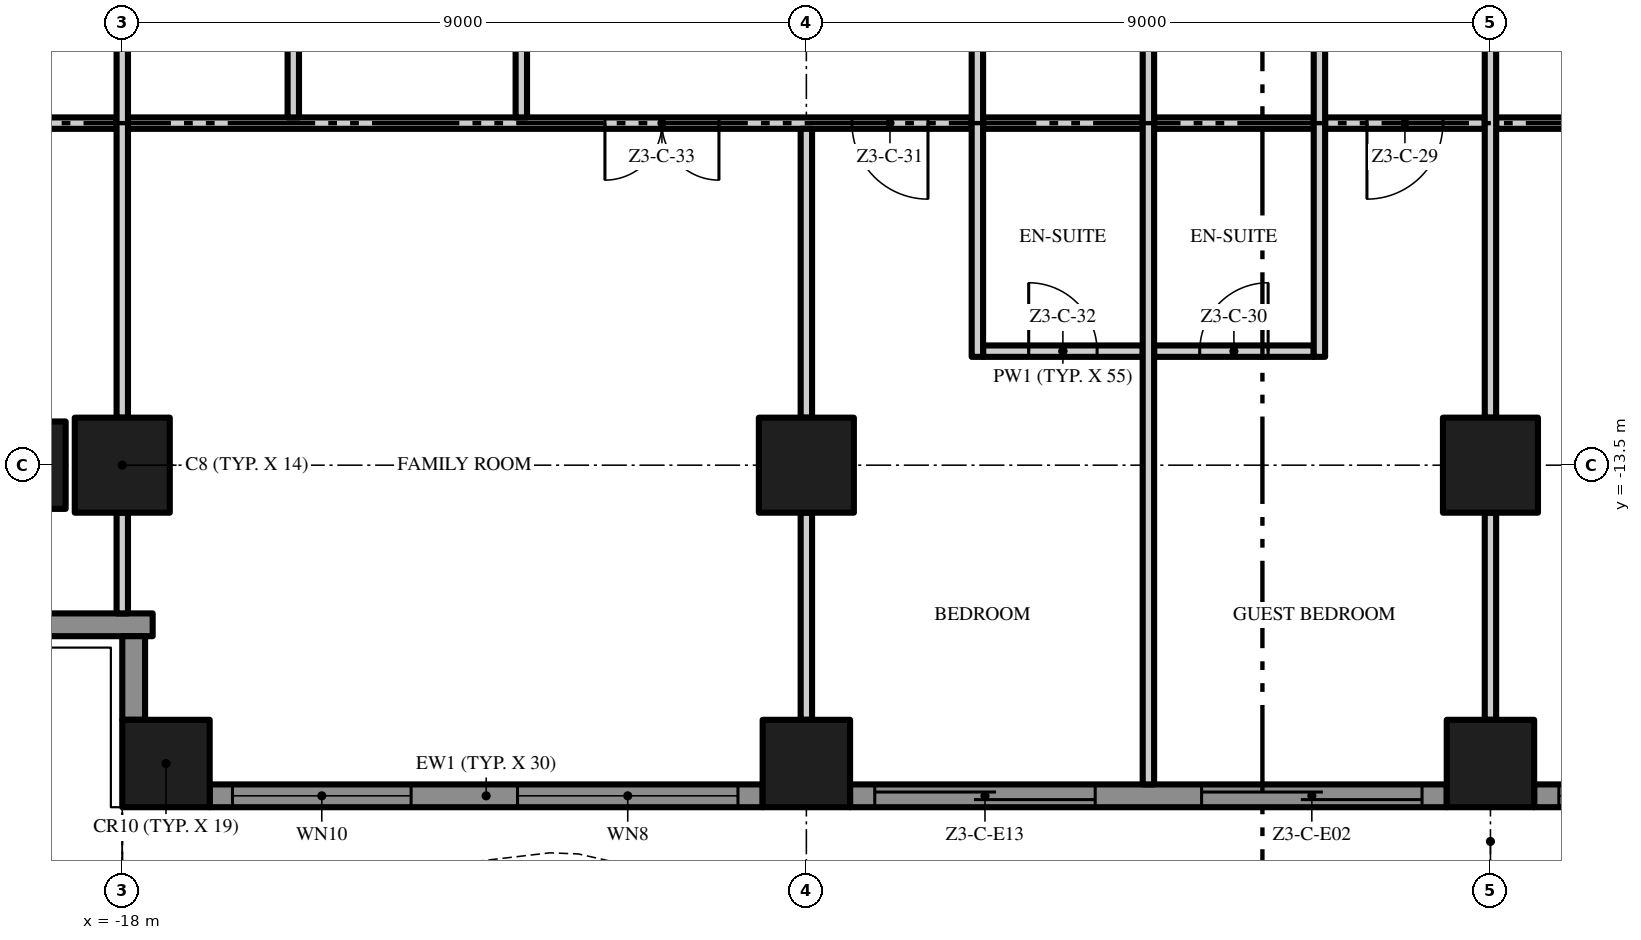
"""IFC4 building model, lengths in metres.
Left out: names, types, materials, properties, quantities, classifications, styles, units other than length and angle.
Written with IfcOpenShell. Run it as: python <this file> out.ifc"""

import sys

from ifc_helpers import new_model, si_unit, direction, frame, frame_2d, origin, origin_2d, place, context, subcontext, project, spatial, polyline, rectangle, outline, extrude, element, fill, save


model = new_model("IFC4")
c1 = context("Model", 3, precision=1e-05, world=origin(), true_north=direction((0.0, 1.0)))
c2 = subcontext(c1, "Body", "Model", "MODEL_VIEW")
j1 = project(units=[si_unit("LENGTHUNIT", "METRE"), si_unit("PLANEANGLEUNIT", "RADIAN")], contexts=[c1])
p1 = place(None, origin())
s1 = spatial("IfcSite", under=j1, at=p1, CompositionType="ELEMENT")
p2 = place(p1, origin())
s2 = spatial("IfcBuilding", under=s1, at=p2, CompositionType="ELEMENT")
p3 = place(p2, frame((0.0, 0.0, 155.4)))
s3 = spatial("IfcBuildingStorey", under=s2, at=p3, CompositionType="ELEMENT", Elevation=155.4)
p4 = place(p3, frame((-18.0, -13.5, 0.0), z_axis=(0.0, 0.0, 1.0), x_axis=(1.0, 0.0, 0.0)))
e1 = element("IfcColumn", 1, at=p4, inside=s3, PredefinedType="COLUMN", context=c2, shape_type="SweptSolid", body=[
    extrude(rectangle(XDim=1.25, YDim=1.25, at=origin_2d()), origin(), (0.0, 0.0, 1.0), 3.5),
])
for number, where, z_axis, x_axis in (
    (2, (-17.425, -17.425, 0.0), (0.0, 0.0, 1.0), (1.0, 0.0, 0.0)),
    (3, (-19.32, -13.5, 0.0), (0.0, 0.0, 1.0), (1.0, 0.0, 0.0)),
):
    element("IfcColumn", number, at=place(p3, frame(where, z_axis=z_axis, x_axis=x_axis)), inside=s3, PredefinedType="COLUMN", context=c2, shape_type="SweptSolid", body=[
        extrude(rectangle(XDim=1.15, YDim=1.15, at=origin_2d()), origin(), (0.0, 0.0, 1.0), 3.5),
    ])
p5 = place(p3, frame((-9.0, -13.5, 0.0), z_axis=(0.0, 0.0, 1.0), x_axis=(1.0, 0.0, 0.0)))
e4 = element("IfcColumn", 4, at=p5, inside=s3, PredefinedType="COLUMN", context=c2, shape_type="SweptSolid", body=[
    extrude(rectangle(XDim=1.25, YDim=1.25, at=origin_2d()), origin(), (0.0, 0.0, 1.0), 3.5),
])
p6 = place(p3, frame((-9.0, -17.425, 0.0), z_axis=(0.0, 0.0, 1.0), x_axis=(1.0, 0.0, 0.0)))
e5 = element("IfcColumn", 5, at=p6, inside=s3, PredefinedType="COLUMN", context=c2, shape_type="SweptSolid", body=[
    extrude(rectangle(XDim=1.15, YDim=1.15, at=origin_2d()), origin(), (0.0, 0.0, 1.0), 3.5),
])
p7 = place(p3, frame((0.0, -13.5, 0.0), z_axis=(0.0, 0.0, 1.0), x_axis=(1.0, 0.0, 0.0)))
e6 = element("IfcColumn", 6, at=p7, inside=s3, PredefinedType="COLUMN", context=c2, shape_type="SweptSolid", body=[
    extrude(rectangle(XDim=1.25, YDim=1.25, at=origin_2d()), origin(), (0.0, 0.0, 1.0), 3.5),
])
p8 = place(p3, frame((0.0, -17.425, 0.0), z_axis=(0.0, 0.0, 1.0), x_axis=(1.0, 0.0, 0.0)))
e7 = element("IfcColumn", 7, at=p8, inside=s3, PredefinedType="COLUMN", context=c2, shape_type="SweptSolid", body=[
    extrude(rectangle(XDim=1.15, YDim=1.15, at=origin_2d()), origin(), (0.0, 0.0, 1.0), 3.5),
])
p9 = place(p3, frame((-9.575, -17.85, 0.0), z_axis=(0.0, 0.0, 1.0), x_axis=(-1.0, 0.0, 0.0)))
e8 = element("IfcWall", 8, at=p9, inside=s3, PredefinedType="SOLIDWALL", context=c2, shape_type="SweptSolid", body=[
    extrude(rectangle(XDim=7.275, YDim=0.3, at=frame_2d((3.638, 0.0))), origin(), (0.0, 0.0, 1.0), 3.5),
])
p10 = place(p9, frame((4.625, 0.0, 0.45)))
e9 = element("IfcOpeningElement", 9, at=p10, cuts=e8, PredefinedType="OPENING", context=c2, shape_type="SweptSolid", body=[
    extrude(rectangle(XDim=2.35, YDim=2.65, at=frame_2d((1.175, 1.325))), frame((0.0, 0.16, 0.0), z_axis=(0.0, -1.0, 0.0), x_axis=(1.0, 0.0, 0.0)), (0.0, 0.0, 1.0), 0.32),
])
p11 = place(p9, frame((0.325, 0.0, 0.45)))
e10 = element("IfcOpeningElement", 10, at=p11, cuts=e8, PredefinedType="OPENING", context=c2, shape_type="SweptSolid", body=[
    extrude(rectangle(XDim=2.9, YDim=2.65, at=frame_2d((1.45, 1.325))), frame((0.0, 0.16, 0.0), z_axis=(0.0, -1.0, 0.0), x_axis=(1.0, 0.0, 0.0)), (0.0, 0.0, 1.0), 0.32),
])
p12 = place(p3, frame((-0.575, -17.85, 0.0), z_axis=(0.0, 0.0, 1.0), x_axis=(-1.0, 0.0, 0.0)))
e11 = element("IfcWall", 11, at=p12, inside=s3, PredefinedType="SOLIDWALL", context=c2, shape_type="SweptSolid", body=[
    extrude(rectangle(XDim=7.85, YDim=0.3, at=frame_2d((3.925, 0.0))), origin(), (0.0, 0.0, 1.0), 3.5),
])
p13 = place(p12, frame((4.625, 0.0, 0.0)))
e12 = element("IfcOpeningElement", 12, at=p13, cuts=e11, PredefinedType="OPENING", context=c2, shape_type="SweptSolid", body=[
    extrude(rectangle(XDim=2.9, YDim=2.4, at=frame_2d((1.45, 1.2))), frame((0.0, 0.16, 0.0), z_axis=(0.0, -1.0, 0.0), x_axis=(1.0, 0.0, 0.0)), (0.0, 0.0, 1.0), 0.32),
])
p14 = place(p12, frame((0.325, 0.0, 0.0)))
e13 = element("IfcOpeningElement", 13, at=p14, cuts=e11, PredefinedType="OPENING", context=c2, shape_type="SweptSolid", body=[
    extrude(rectangle(XDim=2.9, YDim=2.4, at=frame_2d((1.45, 1.2))), frame((0.0, 0.16, 0.0), z_axis=(0.0, -1.0, 0.0), x_axis=(1.0, 0.0, 0.0)), (0.0, 0.0, 1.0), 0.32),
])
p15 = place(p3, frame((8.425, -17.85, 0.0), z_axis=(0.0, 0.0, 1.0), x_axis=(-1.0, 0.0, 0.0)))
e14 = element("IfcWall", 14, at=p15, inside=s3, PredefinedType="SOLIDWALL", context=c2, shape_type="SweptSolid", body=[
    extrude(rectangle(XDim=7.85, YDim=0.3, at=frame_2d((3.925, 0.0))), origin(), (0.0, 0.0, 1.0), 3.5),
])
p16 = place(p15, frame((4.625, 0.0, 0.45)))
e15 = element("IfcOpeningElement", 15, at=p16, cuts=e14, PredefinedType="OPENING", context=c2, shape_type="SweptSolid", body=[
    extrude(rectangle(XDim=2.9, YDim=2.65, at=frame_2d((1.45, 1.325))), frame((0.0, 0.16, 0.0), z_axis=(0.0, -1.0, 0.0), x_axis=(1.0, 0.0, 0.0)), (0.0, 0.0, 1.0), 0.32),
])
p17 = place(p15, frame((0.325, 0.0, 0.45)))
e16 = element("IfcOpeningElement", 16, at=p17, cuts=e14, PredefinedType="OPENING", context=c2, shape_type="SweptSolid", body=[
    extrude(rectangle(XDim=2.9, YDim=2.65, at=frame_2d((1.45, 1.325))), frame((0.0, 0.16, 0.0), z_axis=(0.0, -1.0, 0.0), x_axis=(1.0, 0.0, 0.0)), (0.0, 0.0, 1.0), 0.32),
])
p18 = place(p3, frame((-17.6, -15.6, 0.0), z_axis=(0.0, 0.0, 1.0), x_axis=(-1.0, 0.0, 0.0)))
e17 = element("IfcWall", 17, at=p18, inside=s3, PredefinedType="SOLIDWALL", context=c2, shape_type="SweptSolid", body=[
    extrude(rectangle(XDim=2.35, YDim=0.3, at=frame_2d((1.175, 0.0))), origin(), (0.0, 0.0, 1.0), 3.5),
])
p19 = place(p3, frame((-17.85, -16.85, 0.0), z_axis=(0.0, 0.0, 1.0), x_axis=(0.0, 1.0, 0.0)))
e18 = element("IfcWall", 18, at=p19, inside=s3, PredefinedType="SOLIDWALL", context=c2, shape_type="SweptSolid", body=[
    extrude(rectangle(XDim=1.1, YDim=0.3, at=frame_2d((0.55, 0.0))), origin(), (0.0, 0.0, 1.0), 3.5),
])
p20 = place(p3, origin())
e19 = element("IfcWall", 19, at=p20, inside=s3, PredefinedType="USERDEFINED", context=c2, shape_type="SweptSolid", body=[
    extrude(outline(polyline([(-18.0, -20.649), (-16.5, -19.988), (-15.0, -19.255), (-13.5, -18.731), (-12.375, -18.6), (-12.0, -18.615), (-10.5, -18.951), (-9.0, -19.612), (-7.5, -20.345), (-6.0, -20.869), (-4.875, -21.0), (-4.5, -20.985), (-3.0, -20.649), (-1.5, -19.988), (0.0, -19.255), (1.5, -18.731), (2.625, -18.6), (3.0, -18.615), (4.5, -18.951), (6.0, -19.612), (7.5, -20.345), (9.0, -20.869), (10.125, -21.0), (10.5, -20.985), (12.0, -20.649), (13.5, -19.988), (15.0, -19.255), (16.5, -18.731), (17.625, -18.6), (18.0, -18.615), (18.01, -18.365), (17.615, -18.349), (16.444, -18.486), (14.904, -19.024), (13.395, -19.761), (11.921, -20.41), (10.467, -20.736), (10.135, -20.749), (9.056, -20.624), (7.596, -20.114), (6.105, -19.385), (4.579, -18.713), (3.033, -18.366), (2.615, -18.349), (1.444, -18.486), (-0.096, -19.024), (-1.605, -19.761), (-3.079, -20.41), (-4.533, -20.736), (-4.865, -20.749), (-5.944, -20.624), (-7.404, -20.114), (-8.895, -19.385), (-10.421, -18.713), (-11.967, -18.366), (-12.385, -18.349), (-13.556, -18.486), (-15.096, -19.024), (-16.605, -19.761), (-18.101, -20.42), (-18.0, -20.649)])), origin(), (0.0, 0.0, 1.0), 0.9),
])
p21 = place(p3, frame((-6.675, -12.0, 0.0), z_axis=(0.0, 0.0, 1.0), x_axis=(1.0, 0.0, 0.0)))
e20 = element("IfcWall", 20, at=p21, inside=s3, PredefinedType="PARTITIONING", context=c2, shape_type="SweptSolid", body=[
    extrude(rectangle(XDim=2.1, YDim=0.15, at=frame_2d((1.05, 0.0))), origin(), (0.0, 0.0, 1.0), 3.5),
])
p22 = place(p21, frame((0.6, 0.0, 0.0)))
e21 = element("IfcOpeningElement", 21, at=p22, cuts=e20, PredefinedType="OPENING", context=c2, shape_type="SweptSolid", body=[
    extrude(rectangle(XDim=0.9, YDim=2.1, at=frame_2d((0.45, 1.05))), frame((0.0, 0.085, 0.0), z_axis=(0.0, -1.0, 0.0), x_axis=(1.0, 0.0, 0.0)), (0.0, 0.0, 1.0), 0.17),
])
p23 = place(p3, frame((-4.425, -12.0, 0.0), z_axis=(0.0, 0.0, 1.0), x_axis=(1.0, 0.0, 0.0)))
e22 = element("IfcWall", 22, at=p23, inside=s3, PredefinedType="PARTITIONING", context=c2, shape_type="SweptSolid", body=[
    extrude(rectangle(XDim=2.1, YDim=0.15, at=frame_2d((1.05, 0.0))), origin(), (0.0, 0.0, 1.0), 3.5),
])
p24 = place(p23, frame((0.6, 0.0, 0.0)))
e23 = element("IfcOpeningElement", 23, at=p24, cuts=e22, PredefinedType="OPENING", context=c2, shape_type="SweptSolid", body=[
    extrude(rectangle(XDim=0.9, YDim=2.1, at=frame_2d((0.45, 1.05))), frame((0.0, 0.085, 0.0), z_axis=(0.0, -1.0, 0.0), x_axis=(1.0, 0.0, 0.0)), (0.0, 0.0, 1.0), 0.17),
])
p25 = place(p3, frame((-18.075, -9.0, 0.0), z_axis=(0.0, 0.0, 1.0), x_axis=(-1.0, 0.0, 0.0)))
e24 = element("IfcWall", 24, at=p25, inside=s3, PredefinedType="PARTITIONING", context=c2, shape_type="SweptSolid", body=[
    extrude(rectangle(XDim=4.125, YDim=0.15, at=frame_2d((2.062, 0.0))), origin(), (0.0, 0.0, 1.0), 3.5),
])
p26 = place(p25, frame((1.425, 0.0, 0.0)))
e25 = element("IfcOpeningElement", 25, at=p26, cuts=e24, PredefinedType="OPENING", context=c2, shape_type="SweptSolid", body=[
    extrude(rectangle(XDim=1.5, YDim=2.4, at=frame_2d((0.75, 1.2))), frame((0.0, 0.085, 0.0), z_axis=(0.0, -1.0, 0.0), x_axis=(1.0, 0.0, 0.0)), (0.0, 0.0, 1.0), 0.17),
])
p27 = place(p3, frame((-6.825, -9.0, 0.0), z_axis=(0.0, 0.0, 1.0), x_axis=(-1.0, 0.0, 0.0)))
e26 = element("IfcWall", 26, at=p27, inside=s3, PredefinedType="PARTITIONING", context=c2, shape_type="SweptSolid", body=[
    extrude(rectangle(XDim=11.1, YDim=0.15, at=frame_2d((5.55, 0.0))), origin(), (0.0, 0.0, 1.0), 3.5),
])
p28 = place(p27, frame((0.575, 0.0, 0.0)))
e27 = element("IfcOpeningElement", 27, at=p28, cuts=e26, PredefinedType="OPENING", context=c2, shape_type="SweptSolid", body=[
    extrude(rectangle(XDim=1.0, YDim=2.4, at=frame_2d((0.5, 1.2))), frame((0.0, 0.085, 0.0), z_axis=(0.0, -1.0, 0.0), x_axis=(1.0, 0.0, 0.0)), (0.0, 0.0, 1.0), 0.17),
])
p29 = place(p27, frame((3.325, 0.0, 0.0)))
e28 = element("IfcOpeningElement", 28, at=p29, cuts=e26, PredefinedType="OPENING", context=c2, shape_type="SweptSolid", body=[
    extrude(rectangle(XDim=1.5, YDim=2.4, at=frame_2d((0.75, 1.2))), frame((0.0, 0.085, 0.0), z_axis=(0.0, -1.0, 0.0), x_axis=(1.0, 0.0, 0.0)), (0.0, 0.0, 1.0), 0.17),
])
for number, where, z_axis, x_axis in (
    (29, (-6.675, -9.0, 0.0), (0.0, 0.0, 1.0), (1.0, 0.0, 0.0)),
    (30, (-4.425, -9.0, 0.0), (0.0, 0.0, 1.0), (1.0, 0.0, 0.0)),
):
    element("IfcWall", number, at=place(p3, frame(where, z_axis=z_axis, x_axis=x_axis)), inside=s3, PredefinedType="PARTITIONING", context=c2, shape_type="SweptSolid", body=[
        extrude(rectangle(XDim=2.1, YDim=0.15, at=frame_2d((1.05, 0.0))), origin(), (0.0, 0.0, 1.0), 3.5),
    ])
p30 = place(p3, frame((-0.075, -9.0, 0.0), z_axis=(0.0, 0.0, 1.0), x_axis=(-1.0, 0.0, 0.0)))
e31 = element("IfcWall", 31, at=p30, inside=s3, PredefinedType="PARTITIONING", context=c2, shape_type="SweptSolid", body=[
    extrude(rectangle(XDim=2.1, YDim=0.15, at=frame_2d((1.05, 0.0))), origin(), (0.0, 0.0, 1.0), 3.5),
])
p31 = place(p30, frame((0.55, 0.0, 0.0)))
e32 = element("IfcOpeningElement", 32, at=p31, cuts=e31, PredefinedType="OPENING", context=c2, shape_type="SweptSolid", body=[
    extrude(rectangle(XDim=1.0, YDim=2.4, at=frame_2d((0.5, 1.2))), frame((0.0, 0.085, 0.0), z_axis=(0.0, -1.0, 0.0), x_axis=(1.0, 0.0, 0.0)), (0.0, 0.0, 1.0), 0.17),
])
p32 = place(p3, frame((4.425, -9.0, 0.0), z_axis=(0.0, 0.0, 1.0), x_axis=(-1.0, 0.0, 0.0)))
e33 = element("IfcWall", 33, at=p32, inside=s3, PredefinedType="PARTITIONING", context=c2, shape_type="SweptSolid", body=[
    extrude(rectangle(XDim=4.35, YDim=0.15, at=frame_2d((2.175, 0.0))), origin(), (0.0, 0.0, 1.0), 3.5),
])
p33 = place(p32, frame((0.575, 0.0, 0.0)))
e34 = element("IfcOpeningElement", 34, at=p33, cuts=e33, PredefinedType="OPENING", context=c2, shape_type="SweptSolid", body=[
    extrude(rectangle(XDim=1.0, YDim=2.4, at=frame_2d((0.5, 1.2))), frame((0.0, 0.085, 0.0), z_axis=(0.0, -1.0, 0.0), x_axis=(1.0, 0.0, 0.0)), (0.0, 0.0, 1.0), 0.17),
])
p34 = place(p3, frame((-18.0, -15.45, 0.0), z_axis=(0.0, 0.0, 1.0), x_axis=(0.0, 1.0, 0.0)))
e35 = element("IfcWall", 35, at=p34, inside=s3, PredefinedType="PARTITIONING", context=c2, shape_type="SweptSolid", body=[
    extrude(rectangle(XDim=1.325, YDim=0.15, at=frame_2d((0.662, 0.0))), origin(), (0.0, 0.0, 1.0), 3.5),
])
p35 = place(p3, frame((-18.0, -12.875, 0.0), z_axis=(0.0, 0.0, 1.0), x_axis=(0.0, 1.0, 0.0)))
e36 = element("IfcWall", 36, at=p35, inside=s3, PredefinedType="PARTITIONING", context=c2, shape_type="SweptSolid", body=[
    extrude(rectangle(XDim=7.75, YDim=0.15, at=frame_2d((3.875, 0.0))), origin(), (0.0, 0.0, 1.0), 3.5),
])
p36 = place(p3, frame((-15.75, -8.925, 0.0), z_axis=(0.0, 0.0, 1.0), x_axis=(0.0, 1.0, 0.0)))
e37 = element("IfcWall", 37, at=p36, inside=s3, PredefinedType="PARTITIONING", context=c2, shape_type="SweptSolid", body=[
    extrude(rectangle(XDim=4.35, YDim=0.15, at=frame_2d((2.175, 0.0))), origin(), (0.0, 0.0, 1.0), 3.5),
])
p37 = place(p3, frame((-12.75, -8.925, 0.0), z_axis=(0.0, 0.0, 1.0), x_axis=(0.0, 1.0, 0.0)))
e38 = element("IfcWall", 38, at=p37, inside=s3, PredefinedType="PARTITIONING", context=c2, shape_type="SweptSolid", body=[
    extrude(rectangle(XDim=4.5, YDim=0.15, at=frame_2d((2.25, 0.0))), origin(), (0.0, 0.0, 1.0), 3.5),
])
p38 = place(p3, frame((-9.0, -16.85, 0.0), z_axis=(0.0, 0.0, 1.0), x_axis=(0.0, 1.0, 0.0)))
e39 = element("IfcWall", 39, at=p38, inside=s3, PredefinedType="PARTITIONING", context=c2, shape_type="SweptSolid", body=[
    extrude(rectangle(XDim=2.725, YDim=0.15, at=frame_2d((1.363, 0.0))), origin(), (0.0, 0.0, 1.0), 3.5),
])
p39 = place(p3, frame((-9.0, -12.875, 0.0), z_axis=(0.0, 0.0, 1.0), x_axis=(0.0, 1.0, 0.0)))
e40 = element("IfcWall", 40, at=p39, inside=s3, PredefinedType="PARTITIONING", context=c2, shape_type="SweptSolid", body=[
    extrude(rectangle(XDim=3.8, YDim=0.15, at=frame_2d((1.9, 0.0))), origin(), (0.0, 0.0, 1.0), 3.5),
])
p40 = place(p3, frame((-6.75, -12.075, 0.0), z_axis=(0.0, 0.0, 1.0), x_axis=(0.0, 1.0, 0.0)))
e41 = element("IfcWall", 41, at=p40, inside=s3, PredefinedType="PARTITIONING", context=c2, shape_type="SweptSolid", body=[
    extrude(rectangle(XDim=7.65, YDim=0.15, at=frame_2d((3.825, 0.0))), origin(), (0.0, 0.0, 1.0), 3.5),
])
p41 = place(p3, frame((-4.5, -17.7, 0.0), z_axis=(0.0, 0.0, 1.0), x_axis=(0.0, 1.0, 0.0)))
e42 = element("IfcWall", 42, at=p41, inside=s3, PredefinedType="PARTITIONING", context=c2, shape_type="SweptSolid", body=[
    extrude(rectangle(XDim=13.125, YDim=0.15, at=frame_2d((6.562, 0.0))), origin(), (0.0, 0.0, 1.0), 3.5),
])
p42 = place(p3, frame((-2.25, -12.075, 0.0), z_axis=(0.0, 0.0, 1.0), x_axis=(0.0, 1.0, 0.0)))
e43 = element("IfcWall", 43, at=p42, inside=s3, PredefinedType="PARTITIONING", context=c2, shape_type="SweptSolid", body=[
    extrude(rectangle(XDim=7.65, YDim=0.15, at=frame_2d((3.825, 0.0))), origin(), (0.0, 0.0, 1.0), 3.5),
])
p43 = place(p3, frame((0.0, -16.85, 0.0), z_axis=(0.0, 0.0, 1.0), x_axis=(0.0, 1.0, 0.0)))
e44 = element("IfcWall", 44, at=p43, inside=s3, PredefinedType="PARTITIONING", context=c2, shape_type="SweptSolid", body=[
    extrude(rectangle(XDim=2.725, YDim=0.15, at=frame_2d((1.363, 0.0))), origin(), (0.0, 0.0, 1.0), 3.5),
])
p44 = place(p3, frame((0.0, -12.875, 0.0), z_axis=(0.0, 0.0, 1.0), x_axis=(0.0, 1.0, 0.0)))
e45 = element("IfcWall", 45, at=p44, inside=s3, PredefinedType="PARTITIONING", context=c2, shape_type="SweptSolid", body=[
    extrude(rectangle(XDim=7.75, YDim=0.15, at=frame_2d((3.875, 0.0))), origin(), (0.0, 0.0, 1.0), 3.5),
])
p45 = place(p10, origin())
e46 = element("IfcWindow", 46, at=p45, inside=s3, PartitioningType="SINGLE_PANEL", PredefinedType="WINDOW", context=c2, shape_type="SweptSolid", body=[
    extrude(rectangle(XDim=2.35, YDim=2.65, at=frame_2d((1.175, 1.325))), frame((0.0, 0.03, 0.0), z_axis=(0.0, -1.0, 0.0), x_axis=(1.0, 0.0, 0.0)), (0.0, 0.0, 1.0), 0.06),
])
fill(e9, e46)
p46 = place(p11, origin())
e47 = element("IfcWindow", 47, at=p46, inside=s3, PartitioningType="SINGLE_PANEL", PredefinedType="WINDOW", context=c2, shape_type="SweptSolid", body=[
    extrude(rectangle(XDim=2.9, YDim=2.65, at=frame_2d((1.45, 1.325))), frame((0.0, 0.03, 0.0), z_axis=(0.0, -1.0, 0.0), x_axis=(1.0, 0.0, 0.0)), (0.0, 0.0, 1.0), 0.06),
])
fill(e10, e47)
p47 = place(p13, origin())
e48 = element("IfcDoor", 48, at=p47, inside=s3, OperationType="SINGLE_SWING_LEFT", PredefinedType="DOOR", context=c2, shape_type="SweptSolid", body=[
    extrude(rectangle(XDim=2.9, YDim=2.4, at=frame_2d((1.45, 1.2))), frame((0.0, 0.025, 0.0), z_axis=(0.0, -1.0, 0.0), x_axis=(1.0, 0.0, 0.0)), (0.0, 0.0, 1.0), 0.05),
])
fill(e12, e48)
p48 = place(p14, origin())
e49 = element("IfcDoor", 49, at=p48, inside=s3, OperationType="SINGLE_SWING_LEFT", PredefinedType="DOOR", context=c2, shape_type="SweptSolid", body=[
    extrude(rectangle(XDim=2.9, YDim=2.4, at=frame_2d((1.45, 1.2))), frame((0.0, 0.025, 0.0), z_axis=(0.0, -1.0, 0.0), x_axis=(1.0, 0.0, 0.0)), (0.0, 0.0, 1.0), 0.05),
])
fill(e13, e49)
p49 = place(p16, origin())
e50 = element("IfcWindow", 50, at=p49, inside=s3, PartitioningType="SINGLE_PANEL", PredefinedType="WINDOW", context=c2, shape_type="SweptSolid", body=[
    extrude(rectangle(XDim=2.9, YDim=2.65, at=frame_2d((1.45, 1.325))), frame((0.0, 0.03, 0.0), z_axis=(0.0, -1.0, 0.0), x_axis=(1.0, 0.0, 0.0)), (0.0, 0.0, 1.0), 0.06),
])
fill(e15, e50)
p50 = place(p31, origin())
e51 = element("IfcDoor", 51, at=p50, inside=s3, OperationType="SINGLE_SWING_RIGHT", PredefinedType="DOOR", context=c2, shape_type="SweptSolid", body=[
    extrude(rectangle(XDim=1.0, YDim=2.4, at=frame_2d((0.5, 1.2))), frame((0.0, 0.025, 0.0), z_axis=(0.0, -1.0, 0.0), x_axis=(1.0, 0.0, 0.0)), (0.0, 0.0, 1.0), 0.05),
])
fill(e32, e51)
p51 = place(p24, origin())
e52 = element("IfcDoor", 52, at=p51, inside=s3, OperationType="SINGLE_SWING_RIGHT", PredefinedType="DOOR", context=c2, shape_type="SweptSolid", body=[
    extrude(rectangle(XDim=0.9, YDim=2.1, at=frame_2d((0.45, 1.05))), frame((0.0, 0.025, 0.0), z_axis=(0.0, -1.0, 0.0), x_axis=(1.0, 0.0, 0.0)), (0.0, 0.0, 1.0), 0.05),
])
fill(e23, e52)
p52 = place(p28, origin())
e53 = element("IfcDoor", 53, at=p52, inside=s3, OperationType="SINGLE_SWING_LEFT", PredefinedType="DOOR", context=c2, shape_type="SweptSolid", body=[
    extrude(rectangle(XDim=1.0, YDim=2.4, at=frame_2d((0.5, 1.2))), frame((0.0, 0.025, 0.0), z_axis=(0.0, -1.0, 0.0), x_axis=(1.0, 0.0, 0.0)), (0.0, 0.0, 1.0), 0.05),
])
fill(e27, e53)
p53 = place(p22, origin())
e54 = element("IfcDoor", 54, at=p53, inside=s3, OperationType="SINGLE_SWING_LEFT", PredefinedType="DOOR", context=c2, shape_type="SweptSolid", body=[
    extrude(rectangle(XDim=0.9, YDim=2.1, at=frame_2d((0.45, 1.05))), frame((0.0, 0.025, 0.0), z_axis=(0.0, -1.0, 0.0), x_axis=(1.0, 0.0, 0.0)), (0.0, 0.0, 1.0), 0.05),
])
fill(e21, e54)
p54 = place(p29, origin())
e55 = element("IfcDoor", 55, at=p54, inside=s3, OperationType="DOUBLE_DOOR_SINGLE_SWING", PredefinedType="DOOR", context=c2, shape_type="SweptSolid", body=[
    extrude(rectangle(XDim=1.5, YDim=2.4, at=frame_2d((0.75, 1.2))), frame((0.0, 0.025, 0.0), z_axis=(0.0, -1.0, 0.0), x_axis=(1.0, 0.0, 0.0)), (0.0, 0.0, 1.0), 0.05),
])
fill(e28, e55)
save(model, sys.argv[1])
